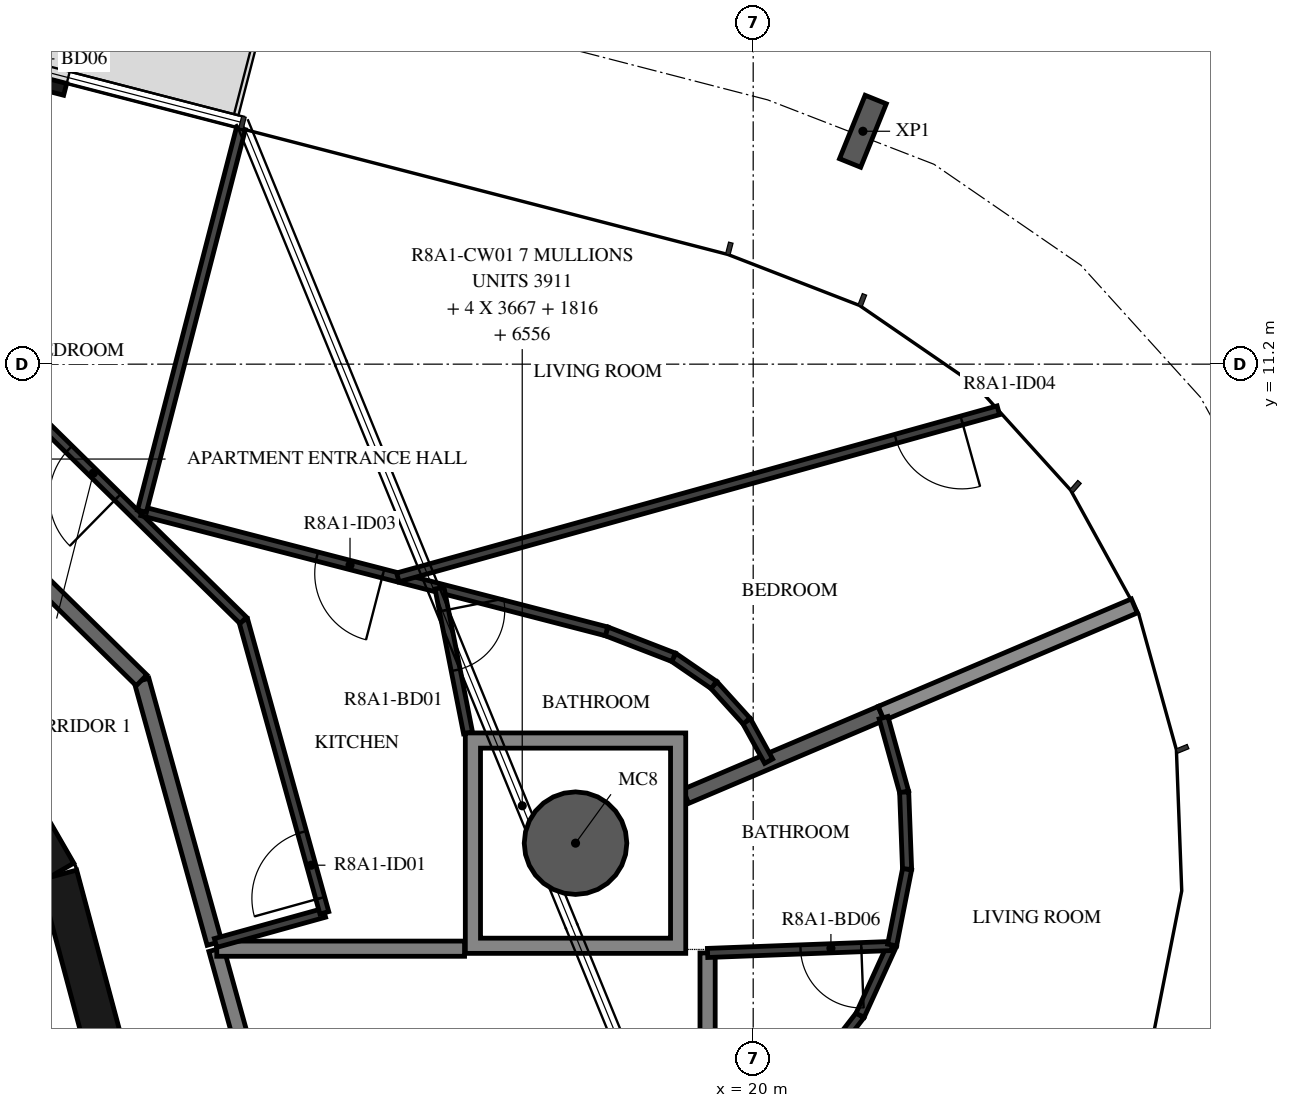
"""IFC4 building model, lengths in metres.
Left out: names, types, materials, properties, quantities, classifications, styles, units other than length and angle.
Written with IfcOpenShell. Run it as: python <this file> out.ifc"""

import sys

from ifc_helpers import new_model, si_unit, direction, frame, frame_2d, origin, origin_2d, place, context, subcontext, project, spatial, polyline, rectangle, hollow_circle, i_section, outline, extrude, element, fill, save


model = new_model("IFC4")
c1 = context("Model", 3, precision=1e-05, world=origin(), true_north=direction((0.0, 1.0)))
c2 = subcontext(c1, "Body", "Model", "MODEL_VIEW")
j1 = project(units=[si_unit("LENGTHUNIT", "METRE"), si_unit("PLANEANGLEUNIT", "RADIAN")], contexts=[c1])
p1 = place(None, origin())
s1 = spatial("IfcSite", under=j1, at=p1, CompositionType="ELEMENT")
p2 = place(p1, origin())
s2 = spatial("IfcBuilding", under=s1, at=p2, CompositionType="ELEMENT")
p3 = place(p2, frame((0.0, 0.0, 301.7)))
s3 = spatial("IfcBuildingStorey", under=s2, at=p3, CompositionType="ELEMENT", Elevation=301.7)
p4 = place(p3, frame((17.663, 4.898, -0.38), z_axis=(0.0, 0.0, 1.0), x_axis=(1.0, 0.0, 0.0)))
e1 = element("IfcColumn", 1, at=p4, inside=s3, PredefinedType="COLUMN", context=c2, shape_type="SweptSolid", body=[
    extrude(hollow_circle(Radius=0.675, WallThickness=0.03, at=origin_2d()), origin(), (0.0, 0.0, 1.0), 3.5),
])
p5 = place(p3, frame((21.443, 14.264, -0.38), z_axis=(0.0, 0.0, 1.0), x_axis=(0.927294785217, -0.374331913293, 0.0)))
e2 = element("IfcColumn", 2, at=p5, inside=s3, PredefinedType="COLUMN", context=c2, shape_type="SweptSolid", body=[
    extrude(i_section(OverallWidth=0.3, OverallDepth=0.9, WebThickness=0.019, FlangeThickness=0.035, FilletRadius=0.03, at=origin_2d()), origin(), (0.0, 0.0, 1.0), 3.5),
])
p6 = place(p3, frame((10.948, 14.815, 0.0), z_axis=(0.0, 0.0, 1.0), x_axis=(-0.968144998439, 0.250390219454, 0.0)))
e3 = element("IfcWall", 3, at=p6, inside=s3, PredefinedType="STANDARD", context=c2, shape_type="SweptSolid", body=[
    extrude(rectangle(XDim=3.2, YDim=0.16, at=frame_2d((1.6, 0.0))), origin(), (0.0, 0.0, 1.0), 3.12),
])
p7 = place(p6, frame((0.4, 0.0, 0.0)))
e4 = element("IfcOpeningElement", 4, at=p7, cuts=e3, PredefinedType="OPENING", context=c2, shape_type="SweptSolid", body=[
    extrude(rectangle(XDim=2.4, YDim=2.4, at=frame_2d((1.2, 1.2))), frame((0.0, 0.09, 0.0), z_axis=(0.0, -1.0, 0.0), x_axis=(1.0, 0.0, 0.0)), (0.0, 0.0, 1.0), 0.18),
])
for number, where, z_axis, x_axis in (
    (5, (11.643, 1.55, 0.0), (0.0, 0.0, 1.0), (-0.259, 0.966, 0.0)),
    (6, (10.845, 4.51, 0.0), (0.0, 0.0, 1.0), (-0.5, 0.866, 0.0)),
):
    element("IfcWall", number, at=place(p3, frame(where, z_axis=z_axis, x_axis=x_axis)), inside=s3, PredefinedType="SHEAR", context=c2, shape_type="SweptSolid", body=[
        extrude(rectangle(XDim=3.033, YDim=0.5, at=frame_2d((1.516, 0.0))), origin(), (0.0, 0.0, 1.0), 3.12),
    ])
p8 = place(p3, frame((13.872, 0.121, 0.0), z_axis=(0.0, 0.0, 1.0), x_axis=(-0.267291928416, 0.963615600228, 0.0)))
e7 = element("IfcWall", 7, at=p8, inside=s3, PredefinedType="STANDARD", context=c2, shape_type="SweptSolid", body=[
    extrude(rectangle(XDim=3.507, YDim=0.2, at=frame_2d((1.753, 0.0))), origin(), (0.0, 0.0, 1.0), 3.12),
])
p9 = place(p3, frame((12.913, 3.581, 0.0), z_axis=(0.0, 0.0, 1.0), x_axis=(-0.267223005422, 0.963634715737, 0.0)))
e8 = element("IfcWall", 8, at=p9, inside=s3, PredefinedType="STANDARD", context=c2, shape_type="SweptSolid", body=[
    extrude(rectangle(XDim=3.591, YDim=0.2, at=frame_2d((1.795, 0.0))), origin(), (0.0, 0.0, 1.0), 3.12),
])
p10 = place(p3, frame((11.953, 7.041, 0.0), z_axis=(0.0, 0.0, 1.0), x_axis=(-0.713250549143, 0.70090916255, 0.0)))
e9 = element("IfcWall", 9, at=p10, inside=s3, PredefinedType="STANDARD", context=c2, shape_type="SweptSolid", body=[
    extrude(rectangle(XDim=7.181, YDim=0.2, at=frame_2d((3.59, 0.0))), origin(), (0.0, 0.0, 1.0), 3.12),
])
p11 = place(p10, frame((2.6, 0.0, 0.0)))
e10 = element("IfcOpeningElement", 10, at=p11, cuts=e9, PredefinedType="OPENING", context=c2, shape_type="SweptSolid", body=[
    extrude(rectangle(XDim=1.0, YDim=2.1, at=frame_2d((0.5, 1.05))), frame((0.0, 0.11, 0.0), z_axis=(0.0, -1.0, 0.0), x_axis=(1.0, 0.0, 0.0)), (0.0, 0.0, 1.0), 0.22),
])
p12 = place(p3, frame((16.203, 3.51, 0.0), z_axis=(0.0, 0.0, 1.0), x_axis=(-1.0, 0.0, 0.0)))
e11 = element("IfcWall", 11, at=p12, inside=s3, PredefinedType="STANDARD", context=c2, shape_type="SweptSolid", body=[
    extrude(rectangle(XDim=3.26, YDim=0.2, at=frame_2d((1.63, 0.0))), origin(), (0.0, 0.0, 1.0), 3.12),
])
p13 = place(p3, frame((19.4, 0.389, 0.0), z_axis=(0.0, 0.0, 1.0), x_axis=(0.0, 1.0, 0.0)))
e12 = element("IfcWall", 12, at=p13, inside=s3, PredefinedType="STANDARD", context=c2, shape_type="SweptSolid", body=[
    extrude(rectangle(XDim=3.065, YDim=0.2, at=frame_2d((1.533, 0.0))), origin(), (0.0, 0.0, 1.0), 3.12),
])
p14 = place(p3, frame((19.113, 5.514, 0.0), z_axis=(0.0, 0.0, 1.0), x_axis=(0.92047794988, 0.390794503268, 0.0)))
e13 = element("IfcWall", 13, at=p14, inside=s3, PredefinedType="STANDARD", context=c2, shape_type="SweptSolid", body=[
    extrude(rectangle(XDim=2.793, YDim=0.2, at=frame_2d((1.396, 0.0))), origin(), (0.0, 0.0, 1.0), 3.12),
])
p15 = place(p3, frame((21.684, 6.605, 0.0), z_axis=(0.0, 0.0, 1.0), x_axis=(0.920517820403, 0.390700578859, 0.0)))
e14 = element("IfcWall", 14, at=p15, inside=s3, PredefinedType="STANDARD", context=c2, shape_type="SweptSolid", body=[
    extrude(rectangle(XDim=3.619, YDim=0.2, at=frame_2d((1.809, 0.0))), origin(), (0.0, 0.0, 1.0), 2.73),
])
p16 = place(p3, frame((12.927, 3.585, 0.0), z_axis=(0.0, 0.0, 1.0), x_axis=(0.963616756608, 0.26728775951, 0.0)))
e15 = element("IfcWall", 15, at=p16, inside=s3, PredefinedType="PARTITIONING", context=c2, shape_type="SweptSolid", body=[
    extrude(rectangle(XDim=1.485, YDim=0.12, at=frame_2d((0.743, 0.0))), origin(), (0.0, 0.0, 1.0), 3.12),
])
p17 = place(p3, frame((14.358, 3.982, 0.0), z_axis=(0.0, 0.0, 1.0), x_axis=(-0.267233823916, 0.963631715623, 0.0)))
e16 = element("IfcWall", 16, at=p17, inside=s3, PredefinedType="PARTITIONING", context=c2, shape_type="SweptSolid", body=[
    extrude(rectangle(XDim=3.992, YDim=0.12, at=frame_2d((1.996, 0.0))), origin(), (0.0, 0.0, 1.0), 3.12),
])
p18 = place(p17, frame((0.2, 0.0, 0.0)))
e17 = element("IfcOpeningElement", 17, at=p18, cuts=e16, PredefinedType="OPENING", context=c2, shape_type="SweptSolid", body=[
    extrude(rectangle(XDim=0.9, YDim=2.1, at=frame_2d((0.45, 1.05))), frame((0.0, 0.07, 0.0), z_axis=(0.0, -1.0, 0.0), x_axis=(1.0, 0.0, 0.0)), (0.0, 0.0, 1.0), 0.14),
])
p19 = place(p3, frame((13.291, 7.829, 0.0), z_axis=(0.0, 0.0, 1.0), x_axis=(-0.713255978622, 0.700903637428, 0.0)))
e18 = element("IfcWall", 18, at=p19, inside=s3, PredefinedType="PARTITIONING", context=c2, shape_type="SweptSolid", body=[
    extrude(rectangle(XDim=7.985, YDim=0.12, at=frame_2d((3.992, 0.0))), origin(), (0.0, 0.0, 1.0), 3.12),
])
p20 = place(p19, frame((2.314, 0.0, 0.0)))
e19 = element("IfcOpeningElement", 19, at=p20, cuts=e18, PredefinedType="OPENING", context=c2, shape_type="SweptSolid", body=[
    extrude(rectangle(XDim=0.9, YDim=2.1, at=frame_2d((0.45, 1.05))), frame((0.0, 0.07, 0.0), z_axis=(0.0, -1.0, 0.0), x_axis=(1.0, 0.0, 0.0)), (0.0, 0.0, 1.0), 0.14),
])
p21 = place(p3, frame((20.203, 5.977, 0.0), z_axis=(0.0, 0.0, 1.0), x_axis=(-0.482261544721, 0.876027284098, 0.0)))
e20 = element("IfcWall", 20, at=p21, inside=s3, PredefinedType="PARTITIONING", context=c2, shape_type="SweptSolid", body=[
    extrude(rectangle(XDim=0.601, YDim=0.12, at=frame_2d((0.301, 0.0))), origin(), (0.0, 0.0, 1.0), 3.12),
])
for number, where, z_axis, x_axis in (
    (21, (19.913, 6.504, 0.0), (0.0, 0.0, 1.0), (-0.671, 0.741, 0.0)),
    (22, (19.482, 6.979, 0.0), (0.0, 0.0, 1.0), (-0.824, 0.566, 0.0)),
):
    element("IfcWall", number, at=place(p3, frame(where, z_axis=z_axis, x_axis=x_axis)), inside=s3, PredefinedType="PARTITIONING", context=c2, shape_type="SweptSolid", body=[
        extrude(rectangle(XDim=0.642, YDim=0.12, at=frame_2d((0.321, 0.0))), origin(), (0.0, 0.0, 1.0), 3.12),
    ])
p22 = place(p3, frame((18.953, 7.343, 0.0), z_axis=(0.0, 0.0, 1.0), x_axis=(-0.932458839957, 0.361276226433, 0.0)))
e23 = element("IfcWall", 23, at=p22, inside=s3, PredefinedType="PARTITIONING", context=c2, shape_type="SweptSolid", body=[
    extrude(rectangle(XDim=0.947, YDim=0.12, at=frame_2d((0.473, 0.0))), origin(), (0.0, 0.0, 1.0), 3.12),
])
p23 = place(p3, frame((18.071, 7.685, 0.0), z_axis=(0.0, 0.0, 1.0), x_axis=(-0.968152245082, 0.250362198309, 0.0)))
e24 = element("IfcWall", 24, at=p23, inside=s3, PredefinedType="PARTITIONING", context=c2, shape_type="SweptSolid", body=[
    extrude(rectangle(XDim=6.313, YDim=0.12, at=frame_2d((3.157, 0.0))), origin(), (0.0, 0.0, 1.0), 3.12),
])
p24 = place(p23, frame((3.036, 0.0, 0.0)))
e25 = element("IfcOpeningElement", 25, at=p24, cuts=e24, PredefinedType="OPENING", context=c2, shape_type="SweptSolid", body=[
    extrude(rectangle(XDim=0.9, YDim=2.1, at=frame_2d((0.45, 1.05))), frame((0.0, 0.07, 0.0), z_axis=(0.0, -1.0, 0.0), x_axis=(1.0, 0.0, 0.0)), (0.0, 0.0, 1.0), 0.14),
])
p25 = place(p3, frame((15.873, 8.253, 0.0), z_axis=(0.0, 0.0, 1.0), x_axis=(0.19340687816, -0.981118636802, 0.0)))
e26 = element("IfcWall", 26, at=p25, inside=s3, PredefinedType="PARTITIONING", context=c2, shape_type="SweptSolid", body=[
    extrude(rectangle(XDim=1.941, YDim=0.12, at=frame_2d((0.971, 0.0))), origin(), (0.0, 0.0, 1.0), 3.12),
])
p26 = place(p25, frame((0.3, 0.0, 0.0)))
e27 = element("IfcOpeningElement", 27, at=p26, cuts=e26, PredefinedType="OPENING", context=c2, shape_type="SweptSolid", body=[
    extrude(rectangle(XDim=0.8, YDim=2.1, at=frame_2d((0.4, 1.05))), frame((0.0, 0.07, 0.0), z_axis=(0.0, -1.0, 0.0), x_axis=(1.0, 0.0, 0.0)), (0.0, 0.0, 1.0), 0.14),
])
p27 = place(p3, frame((23.225, 10.593, 0.0), z_axis=(0.0, 0.0, 1.0), x_axis=(-0.963409492722, -0.268033858559, 0.0)))
e28 = element("IfcWall", 28, at=p27, inside=s3, PredefinedType="PARTITIONING", context=c2, shape_type="SweptSolid", body=[
    extrude(rectangle(XDim=8.2, YDim=0.12, at=frame_2d((4.1, 0.0))), origin(), (0.0, 0.0, 1.0), 3.12),
])
p28 = place(p27, frame((0.5, 0.0, 0.0)))
e29 = element("IfcOpeningElement", 29, at=p28, cuts=e28, PredefinedType="OPENING", context=c2, shape_type="SweptSolid", body=[
    extrude(rectangle(XDim=0.9, YDim=2.1, at=frame_2d((0.45, 1.05))), frame((0.0, 0.07, 0.0), z_axis=(0.0, -1.0, 0.0), x_axis=(1.0, 0.0, 0.0)), (0.0, 0.0, 1.0), 0.14),
])
p29 = place(p3, frame((13.26, 14.3, 0.0), z_axis=(0.0, 0.0, 1.0), x_axis=(-0.25038206324, -0.968147107834, 0.0)))
e30 = element("IfcWall", 30, at=p29, inside=s3, PredefinedType="PARTITIONING", context=c2, shape_type="SweptSolid", body=[
    extrude(rectangle(XDim=5.2, YDim=0.12, at=frame_2d((2.6, 0.0))), origin(), (0.0, 0.0, 1.0), 2.73),
])
p30 = place(p3, frame((20.781, 1.829, 0.0), z_axis=(0.0, 0.0, 1.0), x_axis=(0.613326972183, 0.789829111386, 0.0)))
e31 = element("IfcWall", 31, at=p30, inside=s3, PredefinedType="PARTITIONING", context=c2, shape_type="SweptSolid", body=[
    extrude(rectangle(XDim=1.02, YDim=0.12, at=frame_2d((0.51, 0.0))), origin(), (0.0, 0.0, 1.0), 3.12),
])
p31 = place(p3, frame((21.406, 2.634, 0.0), z_axis=(0.0, 0.0, 1.0), x_axis=(0.414726005229, 0.909946339399, 0.0)))
e32 = element("IfcWall", 32, at=p31, inside=s3, PredefinedType="PARTITIONING", context=c2, shape_type="SweptSolid", body=[
    extrude(rectangle(XDim=1.016, YDim=0.12, at=frame_2d((0.508, 0.0))), origin(), (0.0, 0.0, 1.0), 3.12),
])
p32 = place(p3, frame((21.822, 3.545, 0.0), z_axis=(0.0, 0.0, 1.0), x_axis=(-0.999286397149, -0.037771635816, 0.0)))
e33 = element("IfcWall", 33, at=p32, inside=s3, PredefinedType="PARTITIONING", context=c2, shape_type="SweptSolid", body=[
    extrude(rectangle(XDim=2.424, YDim=0.12, at=frame_2d((1.212, 0.0))), origin(), (0.0, 0.0, 1.0), 3.12),
])
p33 = place(p32, frame((0.4, 0.0, 0.0)))
e34 = element("IfcOpeningElement", 34, at=p33, cuts=e33, PredefinedType="OPENING", context=c2, shape_type="SweptSolid", body=[
    extrude(rectangle(XDim=0.8, YDim=2.1, at=frame_2d((0.4, 1.05))), frame((0.0, 0.07, 0.0), z_axis=(0.0, -1.0, 0.0), x_axis=(1.0, 0.0, 0.0)), (0.0, 0.0, 1.0), 0.14),
])
for number, where, z_axis, x_axis in (
    (35, (21.715, 6.549, 0.0), (0.0, 0.0, 1.0), (0.267, -0.964, 0.0)),
    (36, (21.986, 5.57, 0.0), (0.0, 0.0, 1.0), (0.038, -0.999, 0.0)),
    (37, (22.025, 4.555, 0.0), (0.0, 0.0, 1.0), (-0.194, -0.981, 0.0)),
):
    element("IfcWall", number, at=place(p3, frame(where, z_axis=z_axis, x_axis=x_axis)), inside=s3, PredefinedType="PARTITIONING", context=c2, shape_type="SweptSolid", body=[
        extrude(rectangle(XDim=1.016, YDim=0.12, at=frame_2d((0.508, 0.0))), origin(), (0.0, 0.0, 1.0), 3.12),
    ])
p34 = place(p3, origin())
e38 = element("IfcWall", 38, at=p34, inside=s3, PredefinedType="STANDARD", context=c2, shape_type="SweptSolid", body=[
    extrude(outline(polyline([(19.113, 6.348), (19.113, 3.448), (16.213, 3.448), (16.213, 6.348), (19.113, 6.348)]), holes=[polyline([(16.413, 3.648), (18.913, 3.648), (18.913, 6.148), (16.413, 6.148), (16.413, 3.648)])]), origin(), (0.0, 0.0, 1.0), 3.12),
])
p35 = place(p18, origin())
e39 = element("IfcDoor", 39, at=p35, inside=s3, OperationType="SINGLE_SWING_LEFT", PredefinedType="DOOR", context=c2, shape_type="SweptSolid", body=[
    extrude(rectangle(XDim=0.9, YDim=2.1, at=frame_2d((0.45, 1.05))), frame((0.0, 0.025, 0.0), z_axis=(0.0, -1.0, 0.0), x_axis=(1.0, 0.0, 0.0)), (0.0, 0.0, 1.0), 0.05),
])
fill(e17, e39)
p36 = place(p20, origin())
e40 = element("IfcDoor", 40, at=p36, inside=s3, OperationType="SINGLE_SWING_LEFT", PredefinedType="DOOR", context=c2, shape_type="SweptSolid", body=[
    extrude(rectangle(XDim=0.9, YDim=2.1, at=frame_2d((0.45, 1.05))), frame((0.0, 0.025, 0.0), z_axis=(0.0, -1.0, 0.0), x_axis=(1.0, 0.0, 0.0)), (0.0, 0.0, 1.0), 0.05),
])
fill(e19, e40)
p37 = place(p26, origin())
e41 = element("IfcDoor", 41, at=p37, inside=s3, OperationType="SINGLE_SWING_LEFT", PredefinedType="DOOR", context=c2, shape_type="SweptSolid", body=[
    extrude(rectangle(XDim=0.8, YDim=2.1, at=frame_2d((0.4, 1.05))), frame((0.0, 0.025, 0.0), z_axis=(0.0, -1.0, 0.0), x_axis=(1.0, 0.0, 0.0)), (0.0, 0.0, 1.0), 0.05),
])
fill(e27, e41)
p38 = place(p24, origin())
e42 = element("IfcDoor", 42, at=p38, inside=s3, OperationType="SINGLE_SWING_LEFT", PredefinedType="DOOR", context=c2, shape_type="SweptSolid", body=[
    extrude(rectangle(XDim=0.9, YDim=2.1, at=frame_2d((0.45, 1.05))), frame((0.0, 0.025, 0.0), z_axis=(0.0, -1.0, 0.0), x_axis=(1.0, 0.0, 0.0)), (0.0, 0.0, 1.0), 0.05),
])
fill(e25, e42)
p39 = place(p28, origin())
e43 = element("IfcDoor", 43, at=p39, inside=s3, OperationType="SINGLE_SWING_LEFT", PredefinedType="DOOR", context=c2, shape_type="SweptSolid", body=[
    extrude(rectangle(XDim=0.9, YDim=2.1, at=frame_2d((0.45, 1.05))), frame((0.0, 0.025, 0.0), z_axis=(0.0, -1.0, 0.0), x_axis=(1.0, 0.0, 0.0)), (0.0, 0.0, 1.0), 0.05),
])
fill(e29, e43)
p40 = place(p33, origin())
e44 = element("IfcDoor", 44, at=p40, inside=s3, OperationType="SINGLE_SWING_RIGHT", PredefinedType="DOOR", context=c2, shape_type="SweptSolid", body=[
    extrude(rectangle(XDim=0.8, YDim=2.1, at=frame_2d((0.4, 1.05))), frame((0.0, 0.025, 0.0), z_axis=(0.0, -1.0, 0.0), x_axis=(1.0, 0.0, 0.0)), (0.0, 0.0, 1.0), 0.05),
])
fill(e34, e44)
save(model, sys.argv[1])
